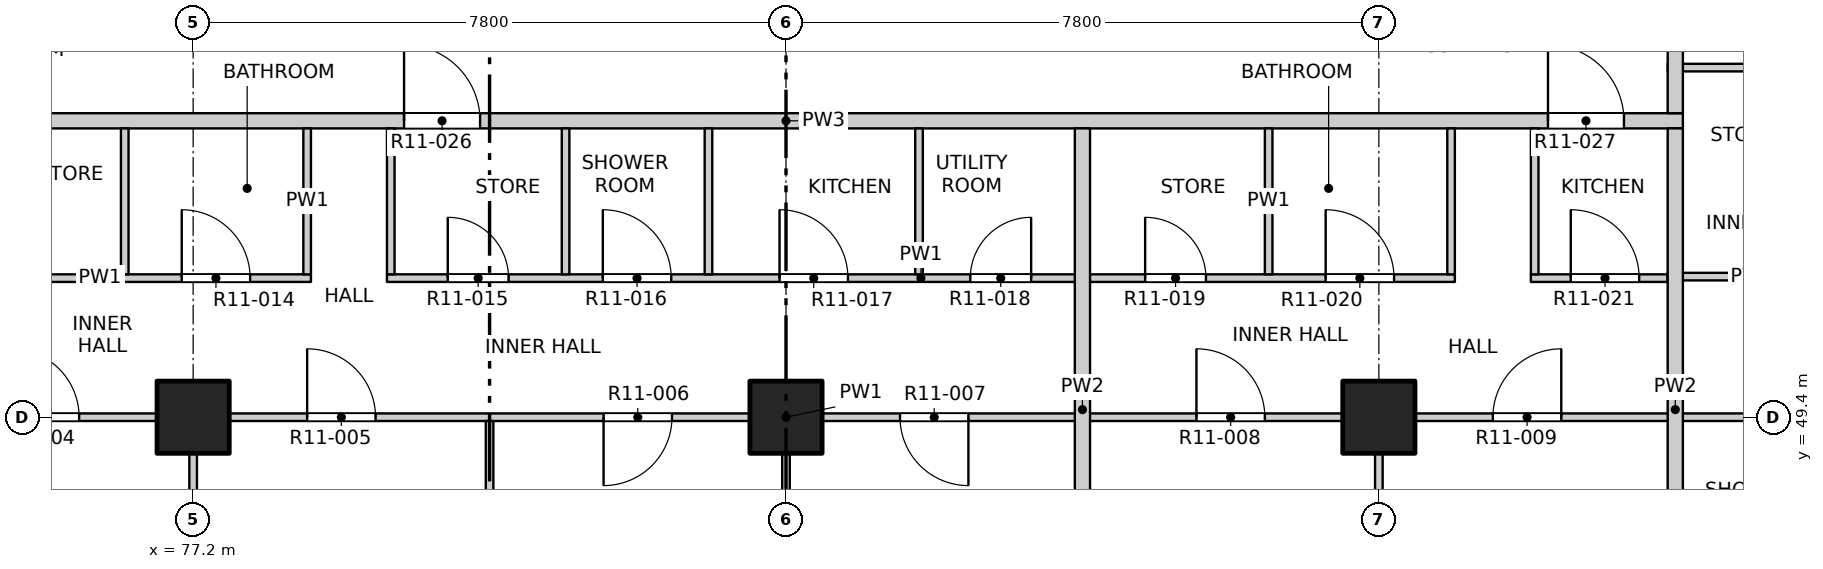
"""IFC4 building model, lengths in metres.
Left out: names, types, materials, properties, quantities, classifications, styles, units other than length and angle.
Written with IfcOpenShell. Run it as: python <this file> out.ifc"""

import sys

from ifc_helpers import new_model, si_unit, direction, frame, frame_2d, origin, origin_2d, place, context, subcontext, project, spatial, rectangle, extrude, element, fill, save


model = new_model("IFC4")
c1 = context("Model", 3, precision=1e-05, world=origin(), true_north=direction((0.0, 1.0)))
c2 = subcontext(c1, "Body", "Model", "MODEL_VIEW")
j1 = project(units=[si_unit("LENGTHUNIT", "METRE"), si_unit("PLANEANGLEUNIT", "RADIAN")], contexts=[c1])
p1 = place(None, origin())
s1 = spatial("IfcSite", under=j1, at=p1, CompositionType="ELEMENT")
p2 = place(p1, origin())
s2 = spatial("IfcBuilding", under=s1, at=p2, CompositionType="ELEMENT")
p3 = place(p2, frame((0.0, 0.0, 130.5)))
s3 = spatial("IfcBuildingStorey", under=s2, at=p3, CompositionType="ELEMENT", Elevation=130.5)
for number, where, z_axis, x_axis in (
    (1, (77.2, 49.4, -0.25), (0.0, 0.0, 1.0), (1.0, 0.0, 0.0)),
    (2, (85.0, 49.4, -0.25), (0.0, 0.0, 1.0), (1.0, 0.0, 0.0)),
    (3, (92.8, 49.4, -0.25), (0.0, 0.0, 1.0), (1.0, 0.0, 0.0)),
):
    element("IfcColumn", number, at=place(p3, frame(where, z_axis=z_axis, x_axis=x_axis)), inside=s3, PredefinedType="COLUMN", context=c2, shape_type="SweptSolid", body=[
        extrude(rectangle(XDim=0.95, YDim=0.95, at=origin_2d()), origin(), (0.0, 0.0, 1.0), 3.4),
    ])
p4 = place(p3, frame((65.8, 49.4, 0.0), z_axis=(0.0, 0.0, 1.0), x_axis=(1.0, 0.0, 0.0)))
e4 = element("IfcWall", 4, at=p4, inside=s3, PredefinedType="PARTITIONING", context=c2, shape_type="SweptSolid", body=[
    extrude(rectangle(XDim=38.4, YDim=0.1, at=frame_2d((19.2, 0.0))), origin(), (0.0, 0.0, 1.0), 3.15),
])
p5 = place(p4, frame((4.19, 0.0, 0.0)))
e5 = element("IfcOpeningElement", 5, at=p5, cuts=e4, PredefinedType="OPENING", context=c2, shape_type="SweptSolid", body=[
    extrude(rectangle(XDim=0.9, YDim=2.1, at=frame_2d((0.45, 1.05))), frame((0.0, 0.06, 0.0), z_axis=(0.0, -1.0, 0.0), x_axis=(1.0, 0.0, 0.0)), (0.0, 0.0, 1.0), 0.12),
])
p6 = place(p4, frame((9.0, 0.0, 0.0)))
e6 = element("IfcOpeningElement", 6, at=p6, cuts=e4, PredefinedType="OPENING", context=c2, shape_type="SweptSolid", body=[
    extrude(rectangle(XDim=0.9, YDim=2.1, at=frame_2d((0.45, 1.05))), frame((0.0, 0.06, 0.0), z_axis=(0.0, -1.0, 0.0), x_axis=(1.0, 0.0, 0.0)), (0.0, 0.0, 1.0), 0.12),
])
p7 = place(p4, frame((12.9, 0.0, 0.0)))
e7 = element("IfcOpeningElement", 7, at=p7, cuts=e4, PredefinedType="OPENING", context=c2, shape_type="SweptSolid", body=[
    extrude(rectangle(XDim=0.9, YDim=2.1, at=frame_2d((0.45, 1.05))), frame((0.0, 0.06, 0.0), z_axis=(0.0, -1.0, 0.0), x_axis=(1.0, 0.0, 0.0)), (0.0, 0.0, 1.0), 0.12),
])
p8 = place(p4, frame((16.8, 0.0, 0.0)))
e8 = element("IfcOpeningElement", 8, at=p8, cuts=e4, PredefinedType="OPENING", context=c2, shape_type="SweptSolid", body=[
    extrude(rectangle(XDim=0.9, YDim=2.1, at=frame_2d((0.45, 1.05))), frame((0.0, 0.06, 0.0), z_axis=(0.0, -1.0, 0.0), x_axis=(1.0, 0.0, 0.0)), (0.0, 0.0, 1.0), 0.12),
])
p9 = place(p4, frame((20.7, 0.0, 0.0)))
e9 = element("IfcOpeningElement", 9, at=p9, cuts=e4, PredefinedType="OPENING", context=c2, shape_type="SweptSolid", body=[
    extrude(rectangle(XDim=0.9, YDim=2.1, at=frame_2d((0.45, 1.05))), frame((0.0, 0.06, 0.0), z_axis=(0.0, -1.0, 0.0), x_axis=(1.0, 0.0, 0.0)), (0.0, 0.0, 1.0), 0.12),
])
p10 = place(p4, frame((24.6, 0.0, 0.0)))
e10 = element("IfcOpeningElement", 10, at=p10, cuts=e4, PredefinedType="OPENING", context=c2, shape_type="SweptSolid", body=[
    extrude(rectangle(XDim=0.9, YDim=2.1, at=frame_2d((0.45, 1.05))), frame((0.0, 0.06, 0.0), z_axis=(0.0, -1.0, 0.0), x_axis=(1.0, 0.0, 0.0)), (0.0, 0.0, 1.0), 0.12),
])
p11 = place(p4, frame((28.5, 0.0, 0.0)))
e11 = element("IfcOpeningElement", 11, at=p11, cuts=e4, PredefinedType="OPENING", context=c2, shape_type="SweptSolid", body=[
    extrude(rectangle(XDim=0.9, YDim=2.1, at=frame_2d((0.45, 1.05))), frame((0.0, 0.06, 0.0), z_axis=(0.0, -1.0, 0.0), x_axis=(1.0, 0.0, 0.0)), (0.0, 0.0, 1.0), 0.12),
])
p12 = place(p4, frame((33.31, 0.0, 0.0)))
e12 = element("IfcOpeningElement", 12, at=p12, cuts=e4, PredefinedType="OPENING", context=c2, shape_type="SweptSolid", body=[
    extrude(rectangle(XDim=0.9, YDim=2.1, at=frame_2d((0.45, 1.05))), frame((0.0, 0.06, 0.0), z_axis=(0.0, -1.0, 0.0), x_axis=(1.0, 0.0, 0.0)), (0.0, 0.0, 1.0), 0.12),
])
p13 = place(p3, frame((73.2, 51.23, 0.0), z_axis=(0.0, 0.0, 1.0), x_axis=(1.0, 0.0, 0.0)))
e13 = element("IfcWall", 13, at=p13, inside=s3, PredefinedType="PARTITIONING", context=c2, shape_type="SweptSolid", body=[
    extrude(rectangle(XDim=5.55, YDim=0.1, at=frame_2d((2.775, 0.0))), origin(), (0.0, 0.0, 1.0), 3.15),
])
p14 = place(p13, frame((1.2, 0.0, 0.0)))
e14 = element("IfcOpeningElement", 14, at=p14, cuts=e13, PredefinedType="OPENING", context=c2, shape_type="SweptSolid", body=[
    extrude(rectangle(XDim=0.8, YDim=2.1, at=frame_2d((0.4, 1.05))), frame((0.0, 0.06, 0.0), z_axis=(0.0, -1.0, 0.0), x_axis=(1.0, 0.0, 0.0)), (0.0, 0.0, 1.0), 0.12),
])
p15 = place(p13, frame((3.85, 0.0, 0.0)))
e15 = element("IfcOpeningElement", 15, at=p15, cuts=e13, PredefinedType="OPENING", context=c2, shape_type="SweptSolid", body=[
    extrude(rectangle(XDim=0.9, YDim=2.1, at=frame_2d((0.45, 1.05))), frame((0.0, 0.06, 0.0), z_axis=(0.0, -1.0, 0.0), x_axis=(1.0, 0.0, 0.0)), (0.0, 0.0, 1.0), 0.12),
])
p16 = place(p3, frame((79.75, 51.23, 0.0), z_axis=(0.0, 0.0, 1.0), x_axis=(1.0, 0.0, 0.0)))
e16 = element("IfcWall", 16, at=p16, inside=s3, PredefinedType="PARTITIONING", context=c2, shape_type="SweptSolid", body=[
    extrude(rectangle(XDim=14.05, YDim=0.1, at=frame_2d((7.025, 0.0))), origin(), (0.0, 0.0, 1.0), 3.15),
])
p17 = place(p16, frame((0.8, 0.0, 0.0)))
e17 = element("IfcOpeningElement", 17, at=p17, cuts=e16, PredefinedType="OPENING", context=c2, shape_type="SweptSolid", body=[
    extrude(rectangle(XDim=0.8, YDim=2.1, at=frame_2d((0.4, 1.05))), frame((0.0, 0.06, 0.0), z_axis=(0.0, -1.0, 0.0), x_axis=(1.0, 0.0, 0.0)), (0.0, 0.0, 1.0), 0.12),
])
p18 = place(p16, frame((2.84, 0.0, 0.0)))
e18 = element("IfcOpeningElement", 18, at=p18, cuts=e16, PredefinedType="OPENING", context=c2, shape_type="SweptSolid", body=[
    extrude(rectangle(XDim=0.9, YDim=2.1, at=frame_2d((0.45, 1.05))), frame((0.0, 0.06, 0.0), z_axis=(0.0, -1.0, 0.0), x_axis=(1.0, 0.0, 0.0)), (0.0, 0.0, 1.0), 0.12),
])
p19 = place(p16, frame((5.165, 0.0, 0.0)))
e19 = element("IfcOpeningElement", 19, at=p19, cuts=e16, PredefinedType="OPENING", context=c2, shape_type="SweptSolid", body=[
    extrude(rectangle(XDim=0.9, YDim=2.1, at=frame_2d((0.45, 1.05))), frame((0.0, 0.06, 0.0), z_axis=(0.0, -1.0, 0.0), x_axis=(1.0, 0.0, 0.0)), (0.0, 0.0, 1.0), 0.12),
])
p20 = place(p16, frame((7.675, 0.0, 0.0)))
e20 = element("IfcOpeningElement", 20, at=p20, cuts=e16, PredefinedType="OPENING", context=c2, shape_type="SweptSolid", body=[
    extrude(rectangle(XDim=0.8, YDim=2.1, at=frame_2d((0.4, 1.05))), frame((0.0, 0.06, 0.0), z_axis=(0.0, -1.0, 0.0), x_axis=(1.0, 0.0, 0.0)), (0.0, 0.0, 1.0), 0.12),
])
p21 = place(p16, frame((9.975, 0.0, 0.0)))
e21 = element("IfcOpeningElement", 21, at=p21, cuts=e16, PredefinedType="OPENING", context=c2, shape_type="SweptSolid", body=[
    extrude(rectangle(XDim=0.8, YDim=2.1, at=frame_2d((0.4, 1.05))), frame((0.0, 0.06, 0.0), z_axis=(0.0, -1.0, 0.0), x_axis=(1.0, 0.0, 0.0)), (0.0, 0.0, 1.0), 0.12),
])
p22 = place(p16, frame((12.35, 0.0, 0.0)))
e22 = element("IfcOpeningElement", 22, at=p22, cuts=e16, PredefinedType="OPENING", context=c2, shape_type="SweptSolid", body=[
    extrude(rectangle(XDim=0.9, YDim=2.1, at=frame_2d((0.45, 1.05))), frame((0.0, 0.06, 0.0), z_axis=(0.0, -1.0, 0.0), x_axis=(1.0, 0.0, 0.0)), (0.0, 0.0, 1.0), 0.12),
])
p23 = place(p3, frame((94.8, 51.23, 0.0), z_axis=(0.0, 0.0, 1.0), x_axis=(1.0, 0.0, 0.0)))
e23 = element("IfcWall", 23, at=p23, inside=s3, PredefinedType="PARTITIONING", context=c2, shape_type="SweptSolid", body=[
    extrude(rectangle(XDim=1.8, YDim=0.1, at=frame_2d((0.9, 0.0))), origin(), (0.0, 0.0, 1.0), 3.15),
])
p24 = place(p23, frame((0.525, 0.0, 0.0)))
e24 = element("IfcOpeningElement", 24, at=p24, cuts=e23, PredefinedType="OPENING", context=c2, shape_type="SweptSolid", body=[
    extrude(rectangle(XDim=0.9, YDim=2.1, at=frame_2d((0.45, 1.05))), frame((0.0, 0.06, 0.0), z_axis=(0.0, -1.0, 0.0), x_axis=(1.0, 0.0, 0.0)), (0.0, 0.0, 1.0), 0.12),
])
p25 = place(p3, frame((96.6, 51.25, 0.0), z_axis=(0.0, 0.0, 1.0), x_axis=(1.0, 0.0, 0.0)))
e25 = element("IfcWall", 25, at=p25, inside=s3, PredefinedType="PARTITIONING", context=c2, shape_type="SweptSolid", body=[
    extrude(rectangle(XDim=2.22, YDim=0.1, at=frame_2d((1.11, 0.0))), origin(), (0.0, 0.0, 1.0), 3.15),
])
p26 = place(p3, frame((73.2, 53.3, 0.0), z_axis=(0.0, 0.0, 1.0), x_axis=(1.0, 0.0, 0.0)))
e26 = element("IfcWall", 26, at=p26, inside=s3, PredefinedType="PARTITIONING", context=c2, shape_type="SweptSolid", body=[
    extrude(rectangle(XDim=23.6, YDim=0.2, at=frame_2d((11.8, 0.0))), origin(), (0.0, 0.0, 1.0), 3.15),
])
p27 = place(p26, frame((6.775, 0.0, 0.0)))
e27 = element("IfcOpeningElement", 27, at=p27, cuts=e26, PredefinedType="OPENING", context=c2, shape_type="SweptSolid", body=[
    extrude(rectangle(XDim=1.0, YDim=2.1, at=frame_2d((0.5, 1.05))), frame((0.0, 0.11, 0.0), z_axis=(0.0, -1.0, 0.0), x_axis=(1.0, 0.0, 0.0)), (0.0, 0.0, 1.0), 0.22),
])
p28 = place(p26, frame((21.825, 0.0, 0.0)))
e28 = element("IfcOpeningElement", 28, at=p28, cuts=e26, PredefinedType="OPENING", context=c2, shape_type="SweptSolid", body=[
    extrude(rectangle(XDim=1.0, YDim=2.1, at=frame_2d((0.5, 1.05))), frame((0.0, 0.11, 0.0), z_axis=(0.0, -1.0, 0.0), x_axis=(1.0, 0.0, 0.0)), (0.0, 0.0, 1.0), 0.22),
])
p29 = place(p3, frame((96.6, 54.0, 0.0), z_axis=(0.0, 0.0, 1.0), x_axis=(1.0, 0.0, 0.0)))
e29 = element("IfcWall", 29, at=p29, inside=s3, PredefinedType="PARTITIONING", context=c2, shape_type="SweptSolid", body=[
    extrude(rectangle(XDim=2.22, YDim=0.1, at=frame_2d((1.11, 0.0))), origin(), (0.0, 0.0, 1.0), 3.15),
])
p30 = place(p3, frame((76.3, 51.28, 0.0), z_axis=(0.0, 0.0, 1.0), x_axis=(0.0, 1.0, 0.0)))
e30 = element("IfcWall", 30, at=p30, inside=s3, PredefinedType="PARTITIONING", context=c2, shape_type="SweptSolid", body=[
    extrude(rectangle(XDim=1.92, YDim=0.1, at=frame_2d((0.96, 0.0))), origin(), (0.0, 0.0, 1.0), 3.15),
])
p31 = place(p3, frame((77.2, 45.8, 0.0), z_axis=(0.0, 0.0, 1.0), x_axis=(0.0, 1.0, 0.0)))
e31 = element("IfcWall", 31, at=p31, inside=s3, PredefinedType="PARTITIONING", context=c2, shape_type="SweptSolid", body=[
    extrude(rectangle(XDim=3.55, YDim=0.1, at=frame_2d((1.775, 0.0))), origin(), (0.0, 0.0, 1.0), 3.15),
])
for number, where, z_axis, x_axis in (
    (32, (78.7, 51.28, 0.0), (0.0, 0.0, 1.0), (0.0, 1.0, 0.0)),
    (33, (79.8, 51.28, 0.0), (0.0, 0.0, 1.0), (0.0, 1.0, 0.0)),
):
    element("IfcWall", number, at=place(p3, frame(where, z_axis=z_axis, x_axis=x_axis)), inside=s3, PredefinedType="PARTITIONING", context=c2, shape_type="SweptSolid", body=[
        extrude(rectangle(XDim=1.92, YDim=0.1, at=frame_2d((0.96, 0.0))), origin(), (0.0, 0.0, 1.0), 3.15),
    ])
p32 = place(p3, frame((81.1, 45.8, 0.0), z_axis=(0.0, 0.0, 1.0), x_axis=(0.0, 1.0, 0.0)))
e34 = element("IfcWall", 34, at=p32, inside=s3, PredefinedType="PARTITIONING", context=c2, shape_type="SweptSolid", body=[
    extrude(rectangle(XDim=3.55, YDim=0.1, at=frame_2d((1.775, 0.0))), origin(), (0.0, 0.0, 1.0), 2.55),
])
for number, where, z_axis, x_axis in (
    (35, (82.1, 51.28, 0.0), (0.0, 0.0, 1.0), (0.0, 1.0, 0.0)),
    (36, (83.98, 51.28, 0.0), (0.0, 0.0, 1.0), (0.0, 1.0, 0.0)),
):
    element("IfcWall", number, at=place(p3, frame(where, z_axis=z_axis, x_axis=x_axis)), inside=s3, PredefinedType="PARTITIONING", context=c2, shape_type="SweptSolid", body=[
        extrude(rectangle(XDim=1.92, YDim=0.1, at=frame_2d((0.96, 0.0))), origin(), (0.0, 0.0, 1.0), 3.15),
    ])
p33 = place(p3, frame((85.0, 45.8, 0.0), z_axis=(0.0, 0.0, 1.0), x_axis=(0.0, 1.0, 0.0)))
e37 = element("IfcWall", 37, at=p33, inside=s3, PredefinedType="PARTITIONING", context=c2, shape_type="SweptSolid", body=[
    extrude(rectangle(XDim=3.55, YDim=0.1, at=frame_2d((1.775, 0.0))), origin(), (0.0, 0.0, 1.0), 3.15),
])
p34 = place(p3, frame((86.75, 51.28, 0.0), z_axis=(0.0, 0.0, 1.0), x_axis=(0.0, 1.0, 0.0)))
e38 = element("IfcWall", 38, at=p34, inside=s3, PredefinedType="PARTITIONING", context=c2, shape_type="SweptSolid", body=[
    extrude(rectangle(XDim=1.92, YDim=0.1, at=frame_2d((0.96, 0.0))), origin(), (0.0, 0.0, 1.0), 3.15),
])
p35 = place(p3, frame((88.9, 45.8, 0.0), z_axis=(0.0, 0.0, 1.0), x_axis=(0.0, 1.0, 0.0)))
e39 = element("IfcWall", 39, at=p35, inside=s3, PredefinedType="PARTITIONING", context=c2, shape_type="SweptSolid", body=[
    extrude(rectangle(XDim=7.4, YDim=0.2, at=frame_2d((3.7, 0.0))), origin(), (0.0, 0.0, 1.0), 2.55),
])
p36 = place(p3, frame((91.35, 51.28, 0.0), z_axis=(0.0, 0.0, 1.0), x_axis=(0.0, 1.0, 0.0)))
e40 = element("IfcWall", 40, at=p36, inside=s3, PredefinedType="PARTITIONING", context=c2, shape_type="SweptSolid", body=[
    extrude(rectangle(XDim=1.92, YDim=0.1, at=frame_2d((0.96, 0.0))), origin(), (0.0, 0.0, 1.0), 3.15),
])
p37 = place(p3, frame((92.8, 45.8, 0.0), z_axis=(0.0, 0.0, 1.0), x_axis=(0.0, 1.0, 0.0)))
e41 = element("IfcWall", 41, at=p37, inside=s3, PredefinedType="PARTITIONING", context=c2, shape_type="SweptSolid", body=[
    extrude(rectangle(XDim=3.55, YDim=0.1, at=frame_2d((1.775, 0.0))), origin(), (0.0, 0.0, 1.0), 3.15),
])
for number, where, z_axis, x_axis in (
    (42, (93.75, 51.28, 0.0), (0.0, 0.0, 1.0), (0.0, 1.0, 0.0)),
    (43, (94.85, 51.28, 0.0), (0.0, 0.0, 1.0), (0.0, 1.0, 0.0)),
):
    element("IfcWall", number, at=place(p3, frame(where, z_axis=z_axis, x_axis=x_axis)), inside=s3, PredefinedType="PARTITIONING", context=c2, shape_type="SweptSolid", body=[
        extrude(rectangle(XDim=1.92, YDim=0.1, at=frame_2d((0.96, 0.0))), origin(), (0.0, 0.0, 1.0), 3.15),
    ])
p38 = place(p3, frame((96.7, 45.8, 0.0), z_axis=(0.0, 0.0, 1.0), x_axis=(0.0, 1.0, 0.0)))
e44 = element("IfcWall", 44, at=p38, inside=s3, PredefinedType="PARTITIONING", context=c2, shape_type="SweptSolid", body=[
    extrude(rectangle(XDim=7.4, YDim=0.2, at=frame_2d((3.7, 0.0))), origin(), (0.0, 0.0, 1.0), 3.15),
])
p39 = place(p3, frame((96.7, 53.4, 0.0), z_axis=(0.0, 0.0, 1.0), x_axis=(0.0, 1.0, 0.0)))
e45 = element("IfcWall", 45, at=p39, inside=s3, PredefinedType="PARTITIONING", context=c2, shape_type="SweptSolid", body=[
    extrude(rectangle(XDim=30.8, YDim=0.2, at=frame_2d((15.4, 0.0))), origin(), (0.0, 0.0, 1.0), 3.15),
])
p40 = place(p39, frame((1.875, 0.0, 0.0)))
e46 = element("IfcOpeningElement", 46, at=p40, cuts=e45, PredefinedType="OPENING", context=c2, shape_type="SweptSolid", body=[
    extrude(rectangle(XDim=1.0, YDim=2.1, at=frame_2d((0.5, 1.05))), frame((0.0, 0.11, 0.0), z_axis=(0.0, -1.0, 0.0), x_axis=(1.0, 0.0, 0.0)), (0.0, 0.0, 1.0), 0.22),
])
p41 = place(p39, frame((10.875, 0.0, 0.0)))
e47 = element("IfcOpeningElement", 47, at=p41, cuts=e45, PredefinedType="OPENING", context=c2, shape_type="SweptSolid", body=[
    extrude(rectangle(XDim=1.0, YDim=2.1, at=frame_2d((0.5, 1.05))), frame((0.0, 0.11, 0.0), z_axis=(0.0, -1.0, 0.0), x_axis=(1.0, 0.0, 0.0)), (0.0, 0.0, 1.0), 0.22),
])
p42 = place(p39, frame((25.725, 0.0, 0.0)))
e48 = element("IfcOpeningElement", 48, at=p42, cuts=e45, PredefinedType="OPENING", context=c2, shape_type="SweptSolid", body=[
    extrude(rectangle(XDim=1.0, YDim=2.1, at=frame_2d((0.5, 1.05))), frame((0.0, 0.11, 0.0), z_axis=(0.0, -1.0, 0.0), x_axis=(1.0, 0.0, 0.0)), (0.0, 0.0, 1.0), 0.22),
])
p43 = place(p6, origin())
e49 = element("IfcDoor", 49, at=p43, inside=s3, OperationType="SINGLE_SWING_LEFT", PredefinedType="DOOR", context=c2, shape_type="SweptSolid", body=[
    extrude(rectangle(XDim=0.9, YDim=2.1, at=frame_2d((0.45, 1.05))), frame((0.0, 0.025, 0.0), z_axis=(0.0, -1.0, 0.0), x_axis=(1.0, 0.0, 0.0)), (0.0, 0.0, 1.0), 0.05),
])
fill(e6, e49)
p44 = place(p7, origin())
e50 = element("IfcDoor", 50, at=p44, inside=s3, OperationType="SINGLE_SWING_LEFT", PredefinedType="DOOR", context=c2, shape_type="SweptSolid", body=[
    extrude(rectangle(XDim=0.9, YDim=2.1, at=frame_2d((0.45, 1.05))), frame((0.0, 0.025, 0.0), z_axis=(0.0, -1.0, 0.0), x_axis=(1.0, 0.0, 0.0)), (0.0, 0.0, 1.0), 0.05),
])
fill(e7, e50)
p45 = place(p8, origin())
e51 = element("IfcDoor", 51, at=p45, inside=s3, OperationType="SINGLE_SWING_RIGHT", PredefinedType="DOOR", context=c2, shape_type="SweptSolid", body=[
    extrude(rectangle(XDim=0.9, YDim=2.1, at=frame_2d((0.45, 1.05))), frame((0.0, 0.025, 0.0), z_axis=(0.0, -1.0, 0.0), x_axis=(1.0, 0.0, 0.0)), (0.0, 0.0, 1.0), 0.05),
])
fill(e8, e51)
p46 = place(p9, origin())
e52 = element("IfcDoor", 52, at=p46, inside=s3, OperationType="SINGLE_SWING_LEFT", PredefinedType="DOOR", context=c2, shape_type="SweptSolid", body=[
    extrude(rectangle(XDim=0.9, YDim=2.1, at=frame_2d((0.45, 1.05))), frame((0.0, 0.025, 0.0), z_axis=(0.0, -1.0, 0.0), x_axis=(1.0, 0.0, 0.0)), (0.0, 0.0, 1.0), 0.05),
])
fill(e9, e52)
p47 = place(p10, origin())
e53 = element("IfcDoor", 53, at=p47, inside=s3, OperationType="SINGLE_SWING_LEFT", PredefinedType="DOOR", context=c2, shape_type="SweptSolid", body=[
    extrude(rectangle(XDim=0.9, YDim=2.1, at=frame_2d((0.45, 1.05))), frame((0.0, 0.025, 0.0), z_axis=(0.0, -1.0, 0.0), x_axis=(1.0, 0.0, 0.0)), (0.0, 0.0, 1.0), 0.05),
])
fill(e10, e53)
p48 = place(p11, origin())
e54 = element("IfcDoor", 54, at=p48, inside=s3, OperationType="SINGLE_SWING_RIGHT", PredefinedType="DOOR", context=c2, shape_type="SweptSolid", body=[
    extrude(rectangle(XDim=0.9, YDim=2.1, at=frame_2d((0.45, 1.05))), frame((0.0, 0.025, 0.0), z_axis=(0.0, -1.0, 0.0), x_axis=(1.0, 0.0, 0.0)), (0.0, 0.0, 1.0), 0.05),
])
fill(e11, e54)
p49 = place(p15, origin())
e55 = element("IfcDoor", 55, at=p49, inside=s3, OperationType="SINGLE_SWING_LEFT", PredefinedType="DOOR", context=c2, shape_type="SweptSolid", body=[
    extrude(rectangle(XDim=0.9, YDim=2.1, at=frame_2d((0.45, 1.05))), frame((0.0, 0.025, 0.0), z_axis=(0.0, -1.0, 0.0), x_axis=(1.0, 0.0, 0.0)), (0.0, 0.0, 1.0), 0.05),
])
fill(e15, e55)
p50 = place(p17, origin())
e56 = element("IfcDoor", 56, at=p50, inside=s3, OperationType="SINGLE_SWING_LEFT", PredefinedType="DOOR", context=c2, shape_type="SweptSolid", body=[
    extrude(rectangle(XDim=0.8, YDim=2.1, at=frame_2d((0.4, 1.05))), frame((0.0, 0.025, 0.0), z_axis=(0.0, -1.0, 0.0), x_axis=(1.0, 0.0, 0.0)), (0.0, 0.0, 1.0), 0.05),
])
fill(e17, e56)
p51 = place(p18, origin())
e57 = element("IfcDoor", 57, at=p51, inside=s3, OperationType="SINGLE_SWING_LEFT", PredefinedType="DOOR", context=c2, shape_type="SweptSolid", body=[
    extrude(rectangle(XDim=0.9, YDim=2.1, at=frame_2d((0.45, 1.05))), frame((0.0, 0.025, 0.0), z_axis=(0.0, -1.0, 0.0), x_axis=(1.0, 0.0, 0.0)), (0.0, 0.0, 1.0), 0.05),
])
fill(e18, e57)
p52 = place(p19, origin())
e58 = element("IfcDoor", 58, at=p52, inside=s3, OperationType="SINGLE_SWING_LEFT", PredefinedType="DOOR", context=c2, shape_type="SweptSolid", body=[
    extrude(rectangle(XDim=0.9, YDim=2.1, at=frame_2d((0.45, 1.05))), frame((0.0, 0.025, 0.0), z_axis=(0.0, -1.0, 0.0), x_axis=(1.0, 0.0, 0.0)), (0.0, 0.0, 1.0), 0.05),
])
fill(e19, e58)
p53 = place(p20, origin())
e59 = element("IfcDoor", 59, at=p53, inside=s3, OperationType="SINGLE_SWING_RIGHT", PredefinedType="DOOR", context=c2, shape_type="SweptSolid", body=[
    extrude(rectangle(XDim=0.8, YDim=2.1, at=frame_2d((0.4, 1.05))), frame((0.0, 0.025, 0.0), z_axis=(0.0, -1.0, 0.0), x_axis=(1.0, 0.0, 0.0)), (0.0, 0.0, 1.0), 0.05),
])
fill(e20, e59)
p54 = place(p21, origin())
e60 = element("IfcDoor", 60, at=p54, inside=s3, OperationType="SINGLE_SWING_LEFT", PredefinedType="DOOR", context=c2, shape_type="SweptSolid", body=[
    extrude(rectangle(XDim=0.8, YDim=2.1, at=frame_2d((0.4, 1.05))), frame((0.0, 0.025, 0.0), z_axis=(0.0, -1.0, 0.0), x_axis=(1.0, 0.0, 0.0)), (0.0, 0.0, 1.0), 0.05),
])
fill(e21, e60)
p55 = place(p22, origin())
e61 = element("IfcDoor", 61, at=p55, inside=s3, OperationType="SINGLE_SWING_LEFT", PredefinedType="DOOR", context=c2, shape_type="SweptSolid", body=[
    extrude(rectangle(XDim=0.9, YDim=2.1, at=frame_2d((0.45, 1.05))), frame((0.0, 0.025, 0.0), z_axis=(0.0, -1.0, 0.0), x_axis=(1.0, 0.0, 0.0)), (0.0, 0.0, 1.0), 0.05),
])
fill(e22, e61)
p56 = place(p24, origin())
e62 = element("IfcDoor", 62, at=p56, inside=s3, OperationType="SINGLE_SWING_LEFT", PredefinedType="DOOR", context=c2, shape_type="SweptSolid", body=[
    extrude(rectangle(XDim=0.9, YDim=2.1, at=frame_2d((0.45, 1.05))), frame((0.0, 0.025, 0.0), z_axis=(0.0, -1.0, 0.0), x_axis=(1.0, 0.0, 0.0)), (0.0, 0.0, 1.0), 0.05),
])
fill(e24, e62)
p57 = place(p27, origin())
e63 = element("IfcDoor", 63, at=p57, inside=s3, OperationType="SINGLE_SWING_LEFT", PredefinedType="DOOR", context=c2, shape_type="SweptSolid", body=[
    extrude(rectangle(XDim=1.0, YDim=2.1, at=frame_2d((0.5, 1.05))), frame((0.0, 0.025, 0.0), z_axis=(0.0, -1.0, 0.0), x_axis=(1.0, 0.0, 0.0)), (0.0, 0.0, 1.0), 0.05),
])
fill(e27, e63)
p58 = place(p28, origin())
e64 = element("IfcDoor", 64, at=p58, inside=s3, OperationType="SINGLE_SWING_LEFT", PredefinedType="DOOR", context=c2, shape_type="SweptSolid", body=[
    extrude(rectangle(XDim=1.0, YDim=2.1, at=frame_2d((0.5, 1.05))), frame((0.0, 0.025, 0.0), z_axis=(0.0, -1.0, 0.0), x_axis=(1.0, 0.0, 0.0)), (0.0, 0.0, 1.0), 0.05),
])
fill(e28, e64)
save(model, sys.argv[1])
